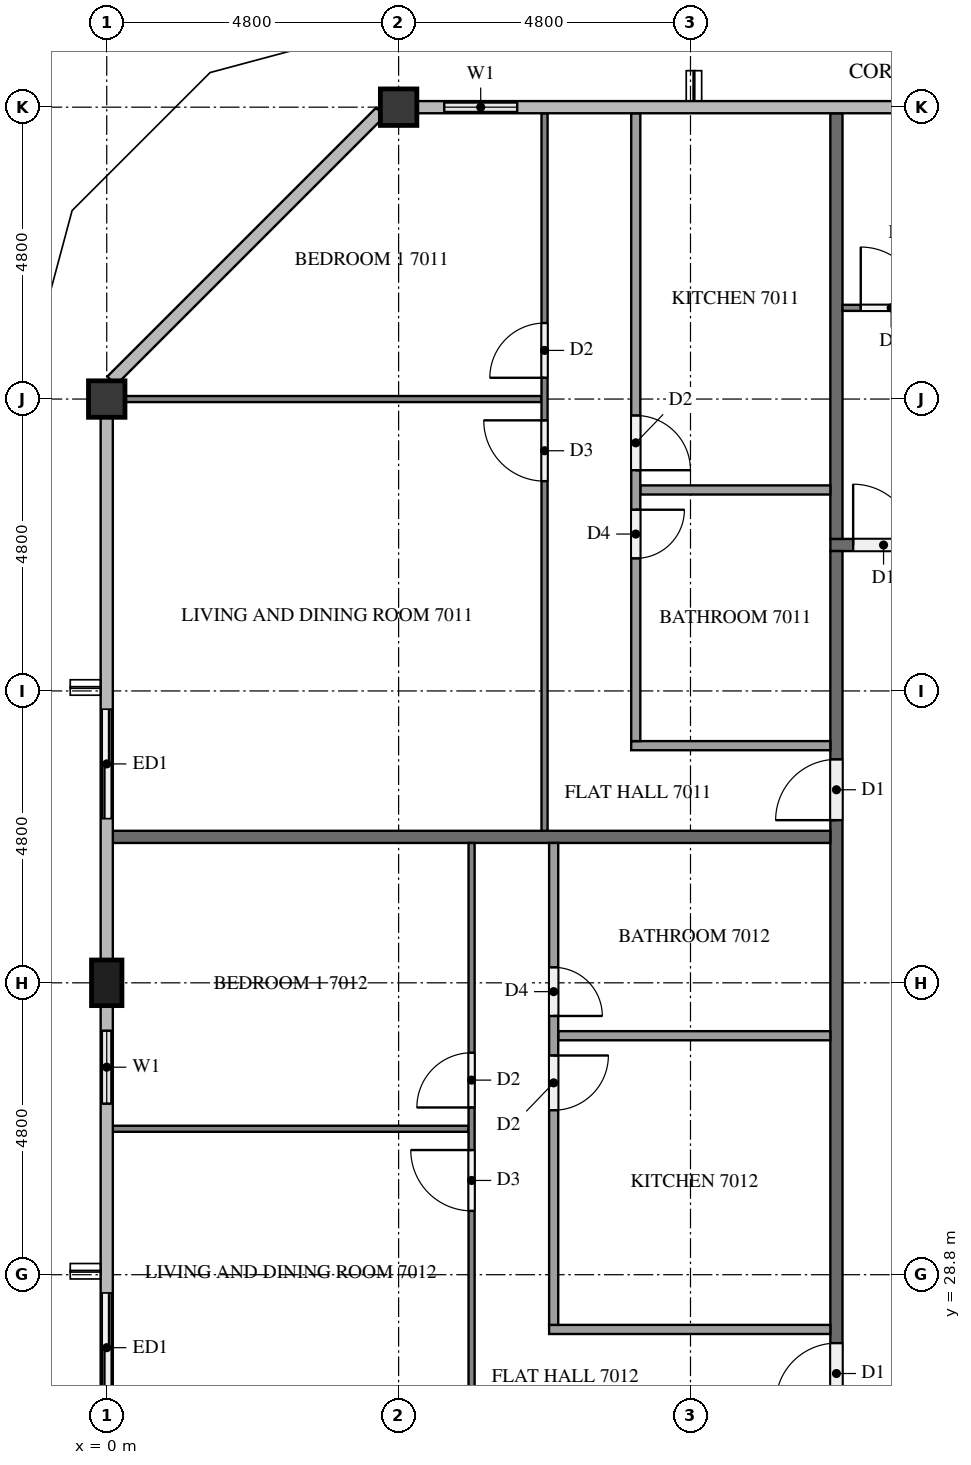
"""IFC4 building model, lengths in metres.
Left out: names, types, materials, properties, quantities, classifications, styles, units other than length and angle.
Written with IfcOpenShell. Run it as: python <this file> out.ifc"""

import sys

from ifc_helpers import new_model, si_unit, direction, frame, frame_2d, origin, origin_2d, place, context, subcontext, project, spatial, rectangle, extrude, element, fill, save


model = new_model("IFC4")
c1 = context("Model", 3, precision=1e-05, world=origin(), true_north=direction((0.0, 1.0)))
c2 = subcontext(c1, "Body", "Model", "MODEL_VIEW")
j1 = project(units=[si_unit("LENGTHUNIT", "METRE"), si_unit("PLANEANGLEUNIT", "RADIAN")], contexts=[c1])
p1 = place(None, origin())
s1 = spatial("IfcSite", under=j1, at=p1, CompositionType="ELEMENT")
p2 = place(p1, origin())
s2 = spatial("IfcBuilding", under=s1, at=p2, CompositionType="ELEMENT")
p3 = place(p2, frame((0.0, 0.0, 268.6)))
s3 = spatial("IfcBuildingStorey", under=s2, at=p3, CompositionType="ELEMENT", Elevation=268.6)
for number, where, z_axis, x_axis in (
    (1, (4.8, 48.0, 0.0), (0.0, 0.0, 1.0), (1.0, 0.0, 0.0)),
    (2, (0.0, 43.2, 0.0), (0.0, 0.0, 1.0), (1.0, 0.0, 0.0)),
):
    element("IfcColumn", number, at=place(p3, frame(where, z_axis=z_axis, x_axis=x_axis)), inside=s3, PredefinedType="COLUMN", context=c2, shape_type="SweptSolid", body=[
        extrude(rectangle(XDim=0.6, YDim=0.6, at=origin_2d()), origin(), (0.0, 0.0, 1.0), 3.2),
    ])
p4 = place(p3, frame((0.0, 33.6, 0.0), z_axis=(0.0, 0.0, 1.0), x_axis=(0.0, 1.0, 0.0)))
e3 = element("IfcColumn", 3, at=p4, inside=s3, PredefinedType="COLUMN", context=c2, shape_type="SweptSolid", body=[
    extrude(rectangle(XDim=0.75, YDim=0.5, at=origin_2d()), origin(), (0.0, 0.0, 1.0), 3.2),
])
p5 = place(p3, frame((7.2, 48.0, 0.0), z_axis=(0.0, 0.0, 1.0), x_axis=(-1.0, 0.0, 0.0)))
e4 = element("IfcWall", 4, at=p5, inside=s3, PredefinedType="SOLIDWALL", context=c2, shape_type="SweptSolid", body=[
    extrude(rectangle(XDim=2.1, YDim=0.15, at=frame_2d((1.05, 0.0))), origin(), (0.0, 0.0, 1.0), 3.2),
])
p6 = place(p5, frame((0.45, 0.0, 0.9)))
e5 = element("IfcOpeningElement", 5, at=p6, cuts=e4, PredefinedType="OPENING", context=c2, shape_type="SweptSolid", body=[
    extrude(rectangle(XDim=1.2, YDim=1.4, at=frame_2d((0.6, 0.7))), frame((0.0, 0.085, 0.0), z_axis=(0.0, -1.0, 0.0), x_axis=(1.0, 0.0, 0.0)), (0.0, 0.0, 1.0), 0.17),
])
p7 = place(p3, frame((0.0, 38.4, 0.0), z_axis=(0.0, 0.0, 1.0), x_axis=(0.0, -1.0, 0.0)))
e6 = element("IfcWall", 6, at=p7, inside=s3, PredefinedType="SOLIDWALL", context=c2, shape_type="SweptSolid", body=[
    extrude(rectangle(XDim=2.4, YDim=0.15, at=frame_2d((1.2, 0.0))), origin(), (0.0, 0.0, 1.0), 3.2),
])
p8 = place(p7, frame((0.3, 0.0, 0.0)))
e7 = element("IfcOpeningElement", 7, at=p8, cuts=e6, PredefinedType="OPENING", context=c2, shape_type="SweptSolid", body=[
    extrude(rectangle(XDim=1.8, YDim=2.4, at=frame_2d((0.9, 1.2))), frame((0.0, 0.085, 0.0), z_axis=(0.0, -1.0, 0.0), x_axis=(1.0, 0.0, 0.0)), (0.0, 0.0, 1.0), 0.17),
])
p9 = place(p3, frame((0.0, 33.225, 0.0), z_axis=(0.0, 0.0, 1.0), x_axis=(0.0, -1.0, 0.0)))
e8 = element("IfcWall", 8, at=p9, inside=s3, PredefinedType="SOLIDWALL", context=c2, shape_type="SweptSolid", body=[
    extrude(rectangle(XDim=2.025, YDim=0.15, at=frame_2d((1.013, 0.0))), origin(), (0.0, 0.0, 1.0), 3.2),
])
p10 = place(p9, frame((0.413, 0.0, 0.9)))
e9 = element("IfcOpeningElement", 9, at=p10, cuts=e8, PredefinedType="OPENING", context=c2, shape_type="SweptSolid", body=[
    extrude(rectangle(XDim=1.2, YDim=1.4, at=frame_2d((0.6, 0.7))), frame((0.0, 0.085, 0.0), z_axis=(0.0, -1.0, 0.0), x_axis=(1.0, 0.0, 0.0)), (0.0, 0.0, 1.0), 0.17),
])
p11 = place(p3, frame((0.0, 28.8, 0.0), z_axis=(0.0, 0.0, 1.0), x_axis=(0.0, -1.0, 0.0)))
e10 = element("IfcWall", 10, at=p11, inside=s3, PredefinedType="SOLIDWALL", context=c2, shape_type="SweptSolid", body=[
    extrude(rectangle(XDim=2.4, YDim=0.15, at=frame_2d((1.2, 0.0))), origin(), (0.0, 0.0, 1.0), 3.2),
])
p12 = place(p11, frame((0.3, 0.0, 0.0)))
e11 = element("IfcOpeningElement", 11, at=p12, cuts=e10, PredefinedType="OPENING", context=c2, shape_type="SweptSolid", body=[
    extrude(rectangle(XDim=1.8, YDim=2.4, at=frame_2d((0.9, 1.2))), frame((0.0, 0.085, 0.0), z_axis=(0.0, -1.0, 0.0), x_axis=(1.0, 0.0, 0.0)), (0.0, 0.0, 1.0), 0.17),
])
p13 = place(p3, frame((11.9, 40.8, 0.0), z_axis=(0.0, 0.0, 1.0), x_axis=(1.0, 0.0, 0.0)))
e12 = element("IfcWall", 12, at=p13, inside=s3, PredefinedType="PARTITIONING", context=c2, shape_type="SweptSolid", body=[
    extrude(rectangle(XDim=38.6, YDim=0.2, at=frame_2d((19.3, 0.0))), origin(), (0.0, 0.0, 1.0), 3.2),
])
p14 = place(p13, frame((31.575, 0.0, 0.0)))
e13 = element("IfcOpeningElement", 13, at=p14, cuts=e12, PredefinedType="OPENING", context=c2, shape_type="SweptSolid", body=[
    extrude(rectangle(XDim=1.0, YDim=2.1, at=frame_2d((0.5, 1.05))), frame((0.0, 0.11, 0.0), z_axis=(0.0, -1.0, 0.0), x_axis=(1.0, 0.0, 0.0)), (0.0, 0.0, 1.0), 0.22),
])
p15 = place(p13, frame((24.375, 0.0, 0.0)))
e14 = element("IfcOpeningElement", 14, at=p15, cuts=e12, PredefinedType="OPENING", context=c2, shape_type="SweptSolid", body=[
    extrude(rectangle(XDim=1.0, YDim=2.1, at=frame_2d((0.5, 1.05))), frame((0.0, 0.11, 0.0), z_axis=(0.0, -1.0, 0.0), x_axis=(1.0, 0.0, 0.0)), (0.0, 0.0, 1.0), 0.22),
])
p16 = place(p13, frame((22.825, 0.0, 0.0)))
e15 = element("IfcOpeningElement", 15, at=p16, cuts=e12, PredefinedType="OPENING", context=c2, shape_type="SweptSolid", body=[
    extrude(rectangle(XDim=1.0, YDim=2.1, at=frame_2d((0.5, 1.05))), frame((0.0, 0.11, 0.0), z_axis=(0.0, -1.0, 0.0), x_axis=(1.0, 0.0, 0.0)), (0.0, 0.0, 1.0), 0.22),
])
p17 = place(p13, frame((0.375, 0.0, 0.0)))
e16 = element("IfcOpeningElement", 16, at=p17, cuts=e12, PredefinedType="OPENING", context=c2, shape_type="SweptSolid", body=[
    extrude(rectangle(XDim=1.0, YDim=2.1, at=frame_2d((0.5, 1.05))), frame((0.0, 0.11, 0.0), z_axis=(0.0, -1.0, 0.0), x_axis=(1.0, 0.0, 0.0)), (0.0, 0.0, 1.0), 0.22),
])
p18 = place(p3, frame((12.0, 12.1, 0.0), z_axis=(0.0, 0.0, 1.0), x_axis=(0.0, 1.0, 0.0)))
e17 = element("IfcWall", 17, at=p18, inside=s3, PredefinedType="PARTITIONING", context=c2, shape_type="SweptSolid", body=[
    extrude(rectangle(XDim=28.6, YDim=0.2, at=frame_2d((14.3, 0.0))), origin(), (0.0, 0.0, 1.0), 3.2),
])
p19 = place(p18, frame((24.175, 0.0, 0.0)))
e18 = element("IfcOpeningElement", 18, at=p19, cuts=e17, PredefinedType="OPENING", context=c2, shape_type="SweptSolid", body=[
    extrude(rectangle(XDim=1.0, YDim=2.1, at=frame_2d((0.5, 1.05))), frame((0.0, 0.11, 0.0), z_axis=(0.0, -1.0, 0.0), x_axis=(1.0, 0.0, 0.0)), (0.0, 0.0, 1.0), 0.22),
])
p20 = place(p18, frame((14.575, 0.0, 0.0)))
e19 = element("IfcOpeningElement", 19, at=p20, cuts=e17, PredefinedType="OPENING", context=c2, shape_type="SweptSolid", body=[
    extrude(rectangle(XDim=1.0, YDim=2.1, at=frame_2d((0.5, 1.05))), frame((0.0, 0.11, 0.0), z_axis=(0.0, -1.0, 0.0), x_axis=(1.0, 0.0, 0.0)), (0.0, 0.0, 1.0), 0.22),
])
p21 = place(p18, frame((0.175, 0.0, 0.0)))
e20 = element("IfcOpeningElement", 20, at=p21, cuts=e17, PredefinedType="OPENING", context=c2, shape_type="SweptSolid", body=[
    extrude(rectangle(XDim=1.0, YDim=2.1, at=frame_2d((0.5, 1.05))), frame((0.0, 0.11, 0.0), z_axis=(0.0, -1.0, 0.0), x_axis=(1.0, 0.0, 0.0)), (0.0, 0.0, 1.0), 0.22),
])
p22 = place(p3, frame((12.0, 47.9, 0.0), z_axis=(0.0, 0.0, 1.0), x_axis=(0.0, -1.0, 0.0)))
e21 = element("IfcWall", 21, at=p22, inside=s3, PredefinedType="PARTITIONING", context=c2, shape_type="SweptSolid", body=[
    extrude(rectangle(XDim=7.0, YDim=0.2, at=frame_2d((3.5, 0.0))), origin(), (0.0, 0.0, 1.0), 3.2),
])
p23 = place(p3, frame((0.1, 36.0, 0.0), z_axis=(0.0, 0.0, 1.0), x_axis=(1.0, 0.0, 0.0)))
e22 = element("IfcWall", 22, at=p23, inside=s3, PredefinedType="PARTITIONING", context=c2, shape_type="SweptSolid", body=[
    extrude(rectangle(XDim=11.8, YDim=0.2, at=frame_2d((5.9, 0.0))), origin(), (0.0, 0.0, 1.0), 3.2),
])
p24 = place(p3, frame((12.1, 44.7, 0.0), z_axis=(0.0, 0.0, 1.0), x_axis=(1.0, 0.0, 0.0)))
e23 = element("IfcWall", 23, at=p24, inside=s3, PredefinedType="PARTITIONING", context=c2, shape_type="SweptSolid", body=[
    extrude(rectangle(XDim=9.4, YDim=0.1, at=frame_2d((4.7, 0.0))), origin(), (0.0, 0.0, 1.0), 3.2),
])
p25 = place(p24, frame((0.3, 0.0, 0.0)))
e24 = element("IfcOpeningElement", 24, at=p25, cuts=e23, PredefinedType="OPENING", context=c2, shape_type="SweptSolid", body=[
    extrude(rectangle(XDim=1.0, YDim=2.1, at=frame_2d((0.5, 1.05))), frame((0.0, 0.06, 0.0), z_axis=(0.0, -1.0, 0.0), x_axis=(1.0, 0.0, 0.0)), (0.0, 0.0, 1.0), 0.12),
])
p26 = place(p24, frame((8.2, 0.0, 0.0)))
e25 = element("IfcOpeningElement", 25, at=p26, cuts=e23, PredefinedType="OPENING", context=c2, shape_type="SweptSolid", body=[
    extrude(rectangle(XDim=0.9, YDim=2.1, at=frame_2d((0.45, 1.05))), frame((0.0, 0.06, 0.0), z_axis=(0.0, -1.0, 0.0), x_axis=(1.0, 0.0, 0.0)), (0.0, 0.0, 1.0), 0.12),
])
p27 = place(p3, frame((7.15, 43.2, 0.0), z_axis=(0.0, 0.0, 1.0), x_axis=(-1.0, 0.0, 0.0)))
e26 = element("IfcWall", 26, at=p27, inside=s3, PredefinedType="PARTITIONING", context=c2, shape_type="SweptSolid", body=[
    extrude(rectangle(XDim=6.85, YDim=0.1, at=frame_2d((3.425, 0.0))), origin(), (0.0, 0.0, 1.0), 3.2),
])
p28 = place(p3, frame((7.2, 36.1, 0.0), z_axis=(0.0, 0.0, 1.0), x_axis=(0.0, 1.0, 0.0)))
e27 = element("IfcWall", 27, at=p28, inside=s3, PredefinedType="PARTITIONING", context=c2, shape_type="SweptSolid", body=[
    extrude(rectangle(XDim=11.8, YDim=0.1, at=frame_2d((5.9, 0.0))), origin(), (0.0, 0.0, 1.0), 3.2),
])
p29 = place(p28, frame((5.75, 0.0, 0.0)))
e28 = element("IfcOpeningElement", 28, at=p29, cuts=e27, PredefinedType="OPENING", context=c2, shape_type="SweptSolid", body=[
    extrude(rectangle(XDim=1.0, YDim=2.1, at=frame_2d((0.5, 1.05))), frame((0.0, 0.06, 0.0), z_axis=(0.0, -1.0, 0.0), x_axis=(1.0, 0.0, 0.0)), (0.0, 0.0, 1.0), 0.12),
])
p30 = place(p28, frame((7.45, 0.0, 0.0)))
e29 = element("IfcOpeningElement", 29, at=p30, cuts=e27, PredefinedType="OPENING", context=c2, shape_type="SweptSolid", body=[
    extrude(rectangle(XDim=0.9, YDim=2.1, at=frame_2d((0.45, 1.05))), frame((0.0, 0.06, 0.0), z_axis=(0.0, -1.0, 0.0), x_axis=(1.0, 0.0, 0.0)), (0.0, 0.0, 1.0), 0.12),
])
p31 = place(p3, frame((11.9, 41.705, 0.0), z_axis=(0.0, 0.0, 1.0), x_axis=(-1.0, 0.0, 0.0)))
e30 = element("IfcWall", 30, at=p31, inside=s3, PredefinedType="PARTITIONING", context=c2, shape_type="SweptSolid", body=[
    extrude(rectangle(XDim=3.125, YDim=0.15, at=frame_2d((1.562, 0.0))), origin(), (0.0, 0.0, 1.0), 3.2),
])
p32 = place(p3, frame((11.9, 37.5, 0.0), z_axis=(0.0, 0.0, 1.0), x_axis=(-1.0, 0.0, 0.0)))
e31 = element("IfcWall", 31, at=p32, inside=s3, PredefinedType="PARTITIONING", context=c2, shape_type="SweptSolid", body=[
    extrude(rectangle(XDim=3.275, YDim=0.15, at=frame_2d((1.637, 0.0))), origin(), (0.0, 0.0, 1.0), 3.2),
])
p33 = place(p3, frame((8.7, 47.9, 0.0), z_axis=(0.0, 0.0, 1.0), x_axis=(0.0, -1.0, 0.0)))
e32 = element("IfcWall", 32, at=p33, inside=s3, PredefinedType="PARTITIONING", context=c2, shape_type="SweptSolid", body=[
    extrude(rectangle(XDim=10.325, YDim=0.15, at=frame_2d((5.163, 0.0))), origin(), (0.0, 0.0, 1.0), 3.2),
])
p34 = place(p33, frame((6.52, 0.0, 0.0)))
e33 = element("IfcOpeningElement", 33, at=p34, cuts=e32, PredefinedType="OPENING", context=c2, shape_type="SweptSolid", body=[
    extrude(rectangle(XDim=0.8, YDim=2.1, at=frame_2d((0.4, 1.05))), frame((0.0, 0.085, 0.0), z_axis=(0.0, -1.0, 0.0), x_axis=(1.0, 0.0, 0.0)), (0.0, 0.0, 1.0), 0.17),
])
p35 = place(p33, frame((4.97, 0.0, 0.0)))
e34 = element("IfcOpeningElement", 34, at=p35, cuts=e32, PredefinedType="OPENING", context=c2, shape_type="SweptSolid", body=[
    extrude(rectangle(XDim=0.9, YDim=2.1, at=frame_2d((0.45, 1.05))), frame((0.0, 0.085, 0.0), z_axis=(0.0, -1.0, 0.0), x_axis=(1.0, 0.0, 0.0)), (0.0, 0.0, 1.0), 0.17),
])
p36 = place(p3, frame((5.95, 31.2, 0.0), z_axis=(0.0, 0.0, 1.0), x_axis=(-1.0, 0.0, 0.0)))
e35 = element("IfcWall", 35, at=p36, inside=s3, PredefinedType="PARTITIONING", context=c2, shape_type="SweptSolid", body=[
    extrude(rectangle(XDim=5.85, YDim=0.1, at=frame_2d((2.925, 0.0))), origin(), (0.0, 0.0, 1.0), 3.2),
])
p37 = place(p3, frame((6.0, 26.5, 0.0), z_axis=(0.0, 0.0, 1.0), x_axis=(0.0, 1.0, 0.0)))
e36 = element("IfcWall", 36, at=p37, inside=s3, PredefinedType="PARTITIONING", context=c2, shape_type="SweptSolid", body=[
    extrude(rectangle(XDim=9.4, YDim=0.1, at=frame_2d((4.7, 0.0))), origin(), (0.0, 0.0, 1.0), 3.2),
])
p38 = place(p37, frame((3.35, 0.0, 0.0)))
e37 = element("IfcOpeningElement", 37, at=p38, cuts=e36, PredefinedType="OPENING", context=c2, shape_type="SweptSolid", body=[
    extrude(rectangle(XDim=1.0, YDim=2.1, at=frame_2d((0.5, 1.05))), frame((0.0, 0.06, 0.0), z_axis=(0.0, -1.0, 0.0), x_axis=(1.0, 0.0, 0.0)), (0.0, 0.0, 1.0), 0.12),
])
p39 = place(p37, frame((5.05, 0.0, 0.0)))
e38 = element("IfcOpeningElement", 38, at=p39, cuts=e36, PredefinedType="OPENING", context=c2, shape_type="SweptSolid", body=[
    extrude(rectangle(XDim=0.9, YDim=2.1, at=frame_2d((0.45, 1.05))), frame((0.0, 0.06, 0.0), z_axis=(0.0, -1.0, 0.0), x_axis=(1.0, 0.0, 0.0)), (0.0, 0.0, 1.0), 0.12),
])
p40 = place(p3, frame((11.9, 32.73, 0.0), z_axis=(0.0, 0.0, 1.0), x_axis=(-1.0, 0.0, 0.0)))
e39 = element("IfcWall", 39, at=p40, inside=s3, PredefinedType="PARTITIONING", context=c2, shape_type="SweptSolid", body=[
    extrude(rectangle(XDim=4.475, YDim=0.15, at=frame_2d((2.237, 0.0))), origin(), (0.0, 0.0, 1.0), 3.2),
])
p41 = place(p3, frame((11.9, 27.9, 0.0), z_axis=(0.0, 0.0, 1.0), x_axis=(-1.0, 0.0, 0.0)))
e40 = element("IfcWall", 40, at=p41, inside=s3, PredefinedType="PARTITIONING", context=c2, shape_type="SweptSolid", body=[
    extrude(rectangle(XDim=4.625, YDim=0.15, at=frame_2d((2.312, 0.0))), origin(), (0.0, 0.0, 1.0), 3.2),
])
p42 = place(p3, frame((7.35, 35.9, 0.0), z_axis=(0.0, 0.0, 1.0), x_axis=(0.0, -1.0, 0.0)))
e41 = element("IfcWall", 41, at=p42, inside=s3, PredefinedType="PARTITIONING", context=c2, shape_type="SweptSolid", body=[
    extrude(rectangle(XDim=7.925, YDim=0.15, at=frame_2d((3.962, 0.0))), origin(), (0.0, 0.0, 1.0), 3.2),
])
p43 = place(p42, frame((3.495, 0.0, 0.0)))
e42 = element("IfcOpeningElement", 42, at=p43, cuts=e41, PredefinedType="OPENING", context=c2, shape_type="SweptSolid", body=[
    extrude(rectangle(XDim=0.9, YDim=2.1, at=frame_2d((0.45, 1.05))), frame((0.0, 0.085, 0.0), z_axis=(0.0, -1.0, 0.0), x_axis=(1.0, 0.0, 0.0)), (0.0, 0.0, 1.0), 0.17),
])
p44 = place(p42, frame((2.045, 0.0, 0.0)))
e43 = element("IfcOpeningElement", 43, at=p44, cuts=e41, PredefinedType="OPENING", context=c2, shape_type="SweptSolid", body=[
    extrude(rectangle(XDim=0.8, YDim=2.1, at=frame_2d((0.4, 1.05))), frame((0.0, 0.085, 0.0), z_axis=(0.0, -1.0, 0.0), x_axis=(1.0, 0.0, 0.0)), (0.0, 0.0, 1.0), 0.17),
])
p45 = place(p6, origin())
e44 = element("IfcWindow", 44, at=p45, inside=s3, PartitioningType="SINGLE_PANEL", PredefinedType="WINDOW", context=c2, shape_type="SweptSolid", body=[
    extrude(rectangle(XDim=1.2, YDim=1.4, at=frame_2d((0.6, 0.7))), frame((0.0, 0.03, 0.0), z_axis=(0.0, -1.0, 0.0), x_axis=(1.0, 0.0, 0.0)), (0.0, 0.0, 1.0), 0.06),
])
fill(e5, e44)
p46 = place(p8, origin())
e45 = element("IfcDoor", 45, at=p46, inside=s3, OperationType="SLIDING_TO_LEFT", PredefinedType="DOOR", context=c2, shape_type="SweptSolid", body=[
    extrude(rectangle(XDim=1.8, YDim=2.4, at=frame_2d((0.9, 1.2))), frame((0.0, 0.025, 0.0), z_axis=(0.0, -1.0, 0.0), x_axis=(1.0, 0.0, 0.0)), (0.0, 0.0, 1.0), 0.05),
])
fill(e7, e45)
p47 = place(p10, origin())
e46 = element("IfcWindow", 46, at=p47, inside=s3, PartitioningType="SINGLE_PANEL", PredefinedType="WINDOW", context=c2, shape_type="SweptSolid", body=[
    extrude(rectangle(XDim=1.2, YDim=1.4, at=frame_2d((0.6, 0.7))), frame((0.0, 0.03, 0.0), z_axis=(0.0, -1.0, 0.0), x_axis=(1.0, 0.0, 0.0)), (0.0, 0.0, 1.0), 0.06),
])
fill(e9, e46)
p48 = place(p12, origin())
e47 = element("IfcDoor", 47, at=p48, inside=s3, OperationType="SLIDING_TO_RIGHT", PredefinedType="DOOR", context=c2, shape_type="SweptSolid", body=[
    extrude(rectangle(XDim=1.8, YDim=2.4, at=frame_2d((0.9, 1.2))), frame((0.0, 0.025, 0.0), z_axis=(0.0, -1.0, 0.0), x_axis=(1.0, 0.0, 0.0)), (0.0, 0.0, 1.0), 0.05),
])
fill(e11, e47)
p49 = place(p17, origin())
e48 = element("IfcDoor", 48, at=p49, inside=s3, OperationType="SINGLE_SWING_LEFT", PredefinedType="DOOR", context=c2, shape_type="SweptSolid", body=[
    extrude(rectangle(XDim=1.0, YDim=2.1, at=frame_2d((0.5, 1.05))), frame((0.0, 0.025, 0.0), z_axis=(0.0, -1.0, 0.0), x_axis=(1.0, 0.0, 0.0)), (0.0, 0.0, 1.0), 0.05),
])
fill(e16, e48)
p50 = place(p19, origin())
e49 = element("IfcDoor", 49, at=p50, inside=s3, OperationType="SINGLE_SWING_LEFT", PredefinedType="DOOR", context=c2, shape_type="SweptSolid", body=[
    extrude(rectangle(XDim=1.0, YDim=2.1, at=frame_2d((0.5, 1.05))), frame((0.0, 0.025, 0.0), z_axis=(0.0, -1.0, 0.0), x_axis=(1.0, 0.0, 0.0)), (0.0, 0.0, 1.0), 0.05),
])
fill(e18, e49)
p51 = place(p20, origin())
e50 = element("IfcDoor", 50, at=p51, inside=s3, OperationType="SINGLE_SWING_LEFT", PredefinedType="DOOR", context=c2, shape_type="SweptSolid", body=[
    extrude(rectangle(XDim=1.0, YDim=2.1, at=frame_2d((0.5, 1.05))), frame((0.0, 0.025, 0.0), z_axis=(0.0, -1.0, 0.0), x_axis=(1.0, 0.0, 0.0)), (0.0, 0.0, 1.0), 0.05),
])
fill(e19, e50)
p52 = place(p25, origin())
e51 = element("IfcDoor", 51, at=p52, inside=s3, OperationType="SINGLE_SWING_LEFT", PredefinedType="DOOR", context=c2, shape_type="SweptSolid", body=[
    extrude(rectangle(XDim=1.0, YDim=2.1, at=frame_2d((0.5, 1.05))), frame((0.0, 0.025, 0.0), z_axis=(0.0, -1.0, 0.0), x_axis=(1.0, 0.0, 0.0)), (0.0, 0.0, 1.0), 0.05),
])
fill(e24, e51)
p53 = place(p29, origin())
e52 = element("IfcDoor", 52, at=p53, inside=s3, OperationType="SINGLE_SWING_RIGHT", PredefinedType="DOOR", context=c2, shape_type="SweptSolid", body=[
    extrude(rectangle(XDim=1.0, YDim=2.1, at=frame_2d((0.5, 1.05))), frame((0.0, 0.025, 0.0), z_axis=(0.0, -1.0, 0.0), x_axis=(1.0, 0.0, 0.0)), (0.0, 0.0, 1.0), 0.05),
])
fill(e28, e52)
p54 = place(p30, origin())
e53 = element("IfcDoor", 53, at=p54, inside=s3, OperationType="SINGLE_SWING_LEFT", PredefinedType="DOOR", context=c2, shape_type="SweptSolid", body=[
    extrude(rectangle(XDim=0.9, YDim=2.1, at=frame_2d((0.45, 1.05))), frame((0.0, 0.025, 0.0), z_axis=(0.0, -1.0, 0.0), x_axis=(1.0, 0.0, 0.0)), (0.0, 0.0, 1.0), 0.05),
])
fill(e29, e53)
p55 = place(p34, origin())
e54 = element("IfcDoor", 54, at=p55, inside=s3, OperationType="SINGLE_SWING_LEFT", PredefinedType="DOOR", context=c2, shape_type="SweptSolid", body=[
    extrude(rectangle(XDim=0.8, YDim=2.1, at=frame_2d((0.4, 1.05))), frame((0.0, 0.025, 0.0), z_axis=(0.0, -1.0, 0.0), x_axis=(1.0, 0.0, 0.0)), (0.0, 0.0, 1.0), 0.05),
])
fill(e33, e54)
p56 = place(p35, origin())
e55 = element("IfcDoor", 55, at=p56, inside=s3, OperationType="SINGLE_SWING_RIGHT", PredefinedType="DOOR", context=c2, shape_type="SweptSolid", body=[
    extrude(rectangle(XDim=0.9, YDim=2.1, at=frame_2d((0.45, 1.05))), frame((0.0, 0.025, 0.0), z_axis=(0.0, -1.0, 0.0), x_axis=(1.0, 0.0, 0.0)), (0.0, 0.0, 1.0), 0.05),
])
fill(e34, e55)
p57 = place(p38, origin())
e56 = element("IfcDoor", 56, at=p57, inside=s3, OperationType="SINGLE_SWING_RIGHT", PredefinedType="DOOR", context=c2, shape_type="SweptSolid", body=[
    extrude(rectangle(XDim=1.0, YDim=2.1, at=frame_2d((0.5, 1.05))), frame((0.0, 0.025, 0.0), z_axis=(0.0, -1.0, 0.0), x_axis=(1.0, 0.0, 0.0)), (0.0, 0.0, 1.0), 0.05),
])
fill(e37, e56)
p58 = place(p39, origin())
e57 = element("IfcDoor", 57, at=p58, inside=s3, OperationType="SINGLE_SWING_LEFT", PredefinedType="DOOR", context=c2, shape_type="SweptSolid", body=[
    extrude(rectangle(XDim=0.9, YDim=2.1, at=frame_2d((0.45, 1.05))), frame((0.0, 0.025, 0.0), z_axis=(0.0, -1.0, 0.0), x_axis=(1.0, 0.0, 0.0)), (0.0, 0.0, 1.0), 0.05),
])
fill(e38, e57)
p59 = place(p43, origin())
e58 = element("IfcDoor", 58, at=p59, inside=s3, OperationType="SINGLE_SWING_LEFT", PredefinedType="DOOR", context=c2, shape_type="SweptSolid", body=[
    extrude(rectangle(XDim=0.9, YDim=2.1, at=frame_2d((0.45, 1.05))), frame((0.0, 0.025, 0.0), z_axis=(0.0, -1.0, 0.0), x_axis=(1.0, 0.0, 0.0)), (0.0, 0.0, 1.0), 0.05),
])
fill(e42, e58)
p60 = place(p44, origin())
e59 = element("IfcDoor", 59, at=p60, inside=s3, OperationType="SINGLE_SWING_RIGHT", PredefinedType="DOOR", context=c2, shape_type="SweptSolid", body=[
    extrude(rectangle(XDim=0.8, YDim=2.1, at=frame_2d((0.4, 1.05))), frame((0.0, 0.025, 0.0), z_axis=(0.0, -1.0, 0.0), x_axis=(1.0, 0.0, 0.0)), (0.0, 0.0, 1.0), 0.05),
])
fill(e43, e59)
save(model, sys.argv[1])
